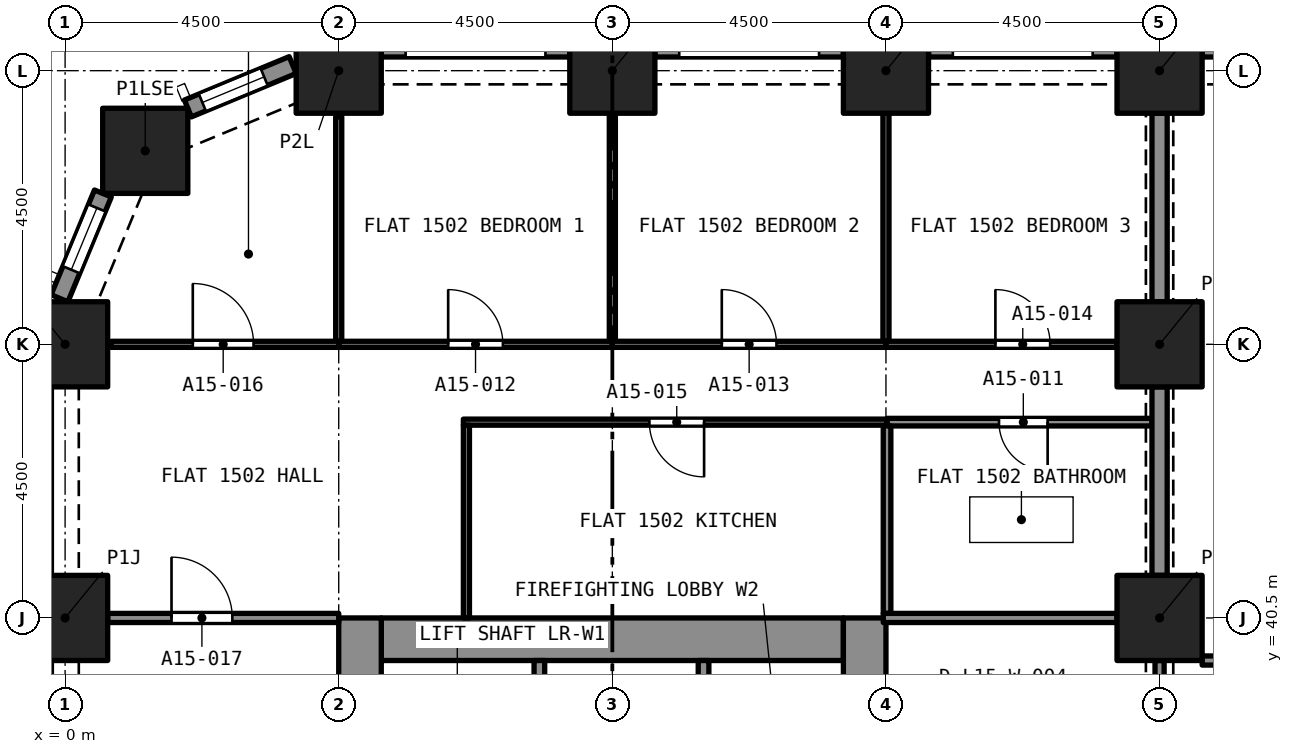
"""IFC4 building model, lengths in metres.
Left out: names, types, materials, properties, quantities, classifications, styles, units other than length and angle.
Written with IfcOpenShell. Run it as: python <this file> out.ifc"""

import sys

from ifc_helpers import new_model, si_unit, direction, frame, frame_2d, origin, origin_2d, place, context, subcontext, project, spatial, rectangle, extrude, element, fill, save


model = new_model("IFC4")
c1 = context("Model", 3, precision=1e-05, world=origin(), true_north=direction((0.0, 1.0)))
c2 = subcontext(c1, "Body", "Model", "MODEL_VIEW")
j1 = project(units=[si_unit("LENGTHUNIT", "METRE"), si_unit("PLANEANGLEUNIT", "RADIAN")], contexts=[c1])
p1 = place(None, origin())
s1 = spatial("IfcSite", under=j1, at=p1, CompositionType="ELEMENT")
p2 = place(p1, origin())
s2 = spatial("IfcBuilding", under=s1, at=p2, CompositionType="ELEMENT")
p3 = place(p2, frame((0.0, 0.0, 59.2)))
s3 = spatial("IfcBuildingStorey", under=s2, at=p3, CompositionType="ELEMENT", Elevation=59.2)
for number, where, z_axis, x_axis in (
    (1, (0.0, 40.5, 0.0), (0.0, 0.0, 1.0), (1.0, 0.0, 0.0)),
    (2, (18.0, 40.5, 0.0), (0.0, 0.0, 1.0), (1.0, 0.0, 0.0)),
    (3, (0.0, 45.0, 0.0), (0.0, 0.0, 1.0), (1.0, 0.0, 0.0)),
    (4, (18.0, 45.0, 0.0), (0.0, 0.0, 1.0), (1.0, 0.0, 0.0)),
    (5, (1.318, 48.182, 0.0), (0.0, 0.0, 1.0), (1.0, 0.0, 0.0)),
    (6, (4.5, 49.5, 0.0), (0.0, 0.0, 1.0), (1.0, 0.0, 0.0)),
    (7, (9.0, 49.5, 0.0), (0.0, 0.0, 1.0), (1.0, 0.0, 0.0)),
    (8, (13.5, 49.5, 0.0), (0.0, 0.0, 1.0), (1.0, 0.0, 0.0)),
    (9, (18.0, 49.5, 0.0), (0.0, 0.0, 1.0), (1.0, 0.0, 0.0)),
):
    element("IfcColumn", number, at=place(p3, frame(where, z_axis=z_axis, x_axis=x_axis)), inside=s3, PredefinedType="COLUMN", context=c2, shape_type="SweptSolid", body=[
        extrude(rectangle(XDim=1.4, YDim=1.4, at=origin_2d()), origin(), (0.0, 0.0, 1.0), 3.2),
    ])
p4 = place(p3, frame((5.2, 40.15, 0.0), z_axis=(0.0, 0.0, 1.0), x_axis=(1.0, 0.0, 0.0)))
e10 = element("IfcWall", 10, at=p4, inside=s3, PredefinedType="SOLIDWALL", context=c2, shape_type="SweptSolid", body=[
    extrude(rectangle(XDim=7.6, YDim=0.7, at=frame_2d((3.8, 0.0))), origin(), (0.0, 0.0, 1.0), 3.2),
])
p5 = place(p3, frame((4.85, 27.0, 0.0), z_axis=(0.0, 0.0, 1.0), x_axis=(0.0, 1.0, 0.0)))
e11 = element("IfcWall", 11, at=p5, inside=s3, PredefinedType="SOLIDWALL", context=c2, shape_type="SweptSolid", body=[
    extrude(rectangle(XDim=13.5, YDim=0.7, at=frame_2d((6.75, 0.0))), origin(), (0.0, 0.0, 1.0), 3.2),
])
p6 = place(p5, frame((8.95, 0.0, 0.0)))
e12 = element("IfcOpeningElement", 12, at=p6, cuts=e11, PredefinedType="OPENING", context=c2, shape_type="SweptSolid", body=[
    extrude(rectangle(XDim=1.2, YDim=2.1, at=frame_2d((0.6, 1.05))), frame((0.0, 0.36, 0.0), z_axis=(0.0, -1.0, 0.0), x_axis=(1.0, 0.0, 0.0)), (0.0, 0.0, 1.0), 0.72),
])
p7 = place(p3, frame((13.15, 27.0, 0.0), z_axis=(0.0, 0.0, 1.0), x_axis=(0.0, 1.0, 0.0)))
e13 = element("IfcWall", 13, at=p7, inside=s3, PredefinedType="SOLIDWALL", context=c2, shape_type="SweptSolid", body=[
    extrude(rectangle(XDim=13.5, YDim=0.7, at=frame_2d((6.75, 0.0))), origin(), (0.0, 0.0, 1.0), 3.2),
])
p8 = place(p7, frame((11.1, 0.0, 0.0)))
e14 = element("IfcOpeningElement", 14, at=p8, cuts=e13, PredefinedType="OPENING", context=c2, shape_type="SweptSolid", body=[
    extrude(rectangle(XDim=1.1, YDim=2.1, at=frame_2d((0.55, 1.05))), frame((0.0, 0.36, 0.0), z_axis=(0.0, -1.0, 0.0), x_axis=(1.0, 0.0, 0.0)), (0.0, 0.0, 1.0), 0.72),
])
p9 = place(p7, frame((8.95, 0.0, 0.0)))
e15 = element("IfcOpeningElement", 15, at=p9, cuts=e13, PredefinedType="OPENING", context=c2, shape_type="SweptSolid", body=[
    extrude(rectangle(XDim=1.2, YDim=2.1, at=frame_2d((0.6, 1.05))), frame((0.0, 0.36, 0.0), z_axis=(0.0, -1.0, 0.0), x_axis=(1.0, 0.0, 0.0)), (0.0, 0.0, 1.0), 0.72),
])
p10 = place(p3, frame((18.7, 49.875, 0.0), z_axis=(0.0, 0.0, 1.0), x_axis=(1.0, 0.0, 0.0)))
e16 = element("IfcWall", 16, at=p10, inside=s3, PredefinedType="SOLIDWALL", context=c2, shape_type="SweptSolid", body=[
    extrude(rectangle(XDim=3.1, YDim=0.3, at=frame_2d((1.55, 0.0))), origin(), (0.0, 0.0, 1.0), 3.2),
])
p11 = place(p10, frame((0.4, 0.0, 0.45)))
e17 = element("IfcOpeningElement", 17, at=p11, cuts=e16, PredefinedType="OPENING", context=c2, shape_type="SweptSolid", body=[
    extrude(rectangle(XDim=2.3, YDim=1.95, at=frame_2d((1.15, 0.975))), frame((0.0, 0.16, 0.0), z_axis=(0.0, -1.0, 0.0), x_axis=(1.0, 0.0, 0.0)), (0.0, 0.0, 1.0), 0.32),
])
p12 = place(p3, frame((14.2, 49.875, 0.0), z_axis=(0.0, 0.0, 1.0), x_axis=(1.0, 0.0, 0.0)))
e18 = element("IfcWall", 18, at=p12, inside=s3, PredefinedType="SOLIDWALL", context=c2, shape_type="SweptSolid", body=[
    extrude(rectangle(XDim=3.1, YDim=0.3, at=frame_2d((1.55, 0.0))), origin(), (0.0, 0.0, 1.0), 3.2),
])
p13 = place(p12, frame((0.4, 0.0, 0.45)))
e19 = element("IfcOpeningElement", 19, at=p13, cuts=e18, PredefinedType="OPENING", context=c2, shape_type="SweptSolid", body=[
    extrude(rectangle(XDim=2.3, YDim=1.95, at=frame_2d((1.15, 0.975))), frame((0.0, 0.16, 0.0), z_axis=(0.0, -1.0, 0.0), x_axis=(1.0, 0.0, 0.0)), (0.0, 0.0, 1.0), 0.32),
])
p14 = place(p3, frame((9.7, 49.875, 0.0), z_axis=(0.0, 0.0, 1.0), x_axis=(1.0, 0.0, 0.0)))
e20 = element("IfcWall", 20, at=p14, inside=s3, PredefinedType="SOLIDWALL", context=c2, shape_type="SweptSolid", body=[
    extrude(rectangle(XDim=3.1, YDim=0.3, at=frame_2d((1.55, 0.0))), origin(), (0.0, 0.0, 1.0), 3.2),
])
p15 = place(p14, frame((0.4, 0.0, 0.45)))
e21 = element("IfcOpeningElement", 21, at=p15, cuts=e20, PredefinedType="OPENING", context=c2, shape_type="SweptSolid", body=[
    extrude(rectangle(XDim=2.3, YDim=1.95, at=frame_2d((1.15, 0.975))), frame((0.0, 0.16, 0.0), z_axis=(0.0, -1.0, 0.0), x_axis=(1.0, 0.0, 0.0)), (0.0, 0.0, 1.0), 0.32),
])
p16 = place(p3, frame((5.2, 49.875, 0.0), z_axis=(0.0, 0.0, 1.0), x_axis=(1.0, 0.0, 0.0)))
e22 = element("IfcWall", 22, at=p16, inside=s3, PredefinedType="SOLIDWALL", context=c2, shape_type="SweptSolid", body=[
    extrude(rectangle(XDim=3.1, YDim=0.3, at=frame_2d((1.55, 0.0))), origin(), (0.0, 0.0, 1.0), 3.2),
])
p17 = place(p16, frame((0.4, 0.0, 0.45)))
e23 = element("IfcOpeningElement", 23, at=p17, cuts=e22, PredefinedType="OPENING", context=c2, shape_type="SweptSolid", body=[
    extrude(rectangle(XDim=2.3, YDim=1.95, at=frame_2d((1.15, 0.975))), frame((0.0, 0.16, 0.0), z_axis=(0.0, -1.0, 0.0), x_axis=(1.0, 0.0, 0.0)), (0.0, 0.0, 1.0), 0.32),
])
p18 = place(p3, frame((2.02, 48.878, 0.0), z_axis=(0.0, 0.0, 1.0), x_axis=(0.923903565336, 0.38262540684, 0.0)))
e24 = element("IfcWall", 24, at=p18, inside=s3, PredefinedType="SOLIDWALL", context=c2, shape_type="SweptSolid", body=[
    extrude(rectangle(XDim=1.865, YDim=0.3, at=frame_2d((0.933, 0.0))), origin(), (0.0, 0.0, 1.0), 3.2),
])
p19 = place(p18, frame((0.258, 0.0, 0.45)))
e25 = element("IfcOpeningElement", 25, at=p19, cuts=e24, PredefinedType="OPENING", context=c2, shape_type="SweptSolid", body=[
    extrude(rectangle(XDim=1.1, YDim=1.95, at=frame_2d((0.55, 0.975))), frame((0.0, 0.16, 0.0), z_axis=(0.0, -1.0, 0.0), x_axis=(1.0, 0.0, 0.0)), (0.0, 0.0, 1.0), 0.32),
])
p20 = place(p3, frame((-0.092, 45.757, 0.0), z_axis=(0.0, 0.0, 1.0), x_axis=(0.382737135771, 0.923857286003, 0.0)))
e26 = element("IfcWall", 26, at=p20, inside=s3, PredefinedType="SOLIDWALL", context=c2, shape_type="SweptSolid", body=[
    extrude(rectangle(XDim=1.865, YDim=0.3, at=frame_2d((0.933, 0.0))), origin(), (0.0, 0.0, 1.0), 3.2),
])
p21 = place(p20, frame((0.508, 0.0, 0.45)))
e27 = element("IfcOpeningElement", 27, at=p21, cuts=e26, PredefinedType="OPENING", context=c2, shape_type="SweptSolid", body=[
    extrude(rectangle(XDim=1.1, YDim=1.95, at=frame_2d((0.55, 0.975))), frame((0.0, 0.16, 0.0), z_axis=(0.0, -1.0, 0.0), x_axis=(1.0, 0.0, 0.0)), (0.0, 0.0, 1.0), 0.32),
])
p22 = place(p3, frame((17.875, 43.72, 0.0), z_axis=(0.0, 0.0, 1.0), x_axis=(-1.0, 0.0, 0.0)))
e28 = element("IfcWall", 28, at=p22, inside=s3, PredefinedType="PARTITIONING", context=c2, shape_type="SweptSolid", body=[
    extrude(rectangle(XDim=4.357, YDim=0.125, at=frame_2d((2.178, 0.0))), origin(), (0.0, 0.0, 1.0), 2.9),
])
p23 = place(p22, frame((1.716, 0.0, 0.0)))
e29 = element("IfcOpeningElement", 29, at=p23, cuts=e28, PredefinedType="OPENING", context=c2, shape_type="SweptSolid", body=[
    extrude(rectangle(XDim=0.8, YDim=2.1, at=frame_2d((0.4, 1.05))), frame((0.0, 0.073, 0.0), z_axis=(0.0, -1.0, 0.0), x_axis=(1.0, 0.0, 0.0)), (0.0, 0.0, 1.0), 0.145),
])
p24 = place(p3, frame((13.518, 40.575, 0.0), z_axis=(0.0, 0.0, 1.0), x_axis=(0.0, 1.0, 0.0)))
e30 = element("IfcWall", 30, at=p24, inside=s3, PredefinedType="PARTITIONING", context=c2, shape_type="SweptSolid", body=[
    extrude(rectangle(XDim=3.083, YDim=0.125, at=frame_2d((1.541, 0.0))), origin(), (0.0, 0.0, 1.0), 2.9),
])
p25 = place(p3, frame((18.0, 41.2, 0.0), z_axis=(0.0, 0.0, 1.0), x_axis=(0.0, 1.0, 0.0)))
e31 = element("IfcWall", 31, at=p25, inside=s3, PredefinedType="PARTITIONING", context=c2, shape_type="SweptSolid", body=[
    extrude(rectangle(XDim=3.1, YDim=0.25, at=frame_2d((1.55, 0.0))), origin(), (0.0, 0.0, 1.0), 2.38),
])
p26 = place(p3, frame((13.456, 40.5, 0.0), z_axis=(0.0, 0.0, 1.0), x_axis=(1.0, 0.0, 0.0)))
e32 = element("IfcWall", 32, at=p26, inside=s3, PredefinedType="PARTITIONING", context=c2, shape_type="SweptSolid", body=[
    extrude(rectangle(XDim=3.844, YDim=0.15, at=frame_2d((1.922, 0.0))), origin(), (0.0, 0.0, 1.0), 2.9),
])
p27 = place(p3, frame((9.0, 45.05, 0.0), z_axis=(0.0, 0.0, 1.0), x_axis=(0.0, 1.0, 0.0)))
e33 = element("IfcWall", 33, at=p27, inside=s3, PredefinedType="PARTITIONING", context=c2, shape_type="SweptSolid", body=[
    extrude(rectangle(XDim=3.75, YDim=0.1, at=frame_2d((1.875, 0.0))), origin(), (0.0, 0.0, 1.0), 2.9),
])
p28 = place(p3, frame((4.5, 45.0, 0.0), z_axis=(0.0, 0.0, 1.0), x_axis=(1.0, 0.0, 0.0)))
e34 = element("IfcWall", 34, at=p28, inside=s3, PredefinedType="PARTITIONING", context=c2, shape_type="SweptSolid", body=[
    extrude(rectangle(XDim=4.5, YDim=0.1, at=frame_2d((2.25, 0.0))), origin(), (0.0, 0.0, 1.0), 2.9),
])
p29 = place(p28, frame((1.8, 0.0, 0.0)))
e35 = element("IfcOpeningElement", 35, at=p29, cuts=e34, PredefinedType="OPENING", context=c2, shape_type="SweptSolid", body=[
    extrude(rectangle(XDim=0.9, YDim=2.1, at=frame_2d((0.45, 1.05))), frame((0.0, 0.06, 0.0), z_axis=(0.0, -1.0, 0.0), x_axis=(1.0, 0.0, 0.0)), (0.0, 0.0, 1.0), 0.12),
])
p30 = place(p3, frame((4.5, 45.05, 0.0), z_axis=(0.0, 0.0, 1.0), x_axis=(0.0, 1.0, 0.0)))
e36 = element("IfcWall", 36, at=p30, inside=s3, PredefinedType="PARTITIONING", context=c2, shape_type="SweptSolid", body=[
    extrude(rectangle(XDim=3.692, YDim=0.1, at=frame_2d((1.846, 0.0))), origin(), (0.0, 0.0, 1.0), 2.9),
])
p31 = place(p3, frame((13.5, 45.05, 0.0), z_axis=(0.0, 0.0, 1.0), x_axis=(0.0, 1.0, 0.0)))
e37 = element("IfcWall", 37, at=p31, inside=s3, PredefinedType="PARTITIONING", context=c2, shape_type="SweptSolid", body=[
    extrude(rectangle(XDim=3.75, YDim=0.1, at=frame_2d((1.875, 0.0))), origin(), (0.0, 0.0, 1.0), 2.9),
])
p32 = place(p3, frame((9.0, 45.0, 0.0), z_axis=(0.0, 0.0, 1.0), x_axis=(1.0, 0.0, 0.0)))
e38 = element("IfcWall", 38, at=p32, inside=s3, PredefinedType="PARTITIONING", context=c2, shape_type="SweptSolid", body=[
    extrude(rectangle(XDim=4.5, YDim=0.1, at=frame_2d((2.25, 0.0))), origin(), (0.0, 0.0, 1.0), 2.9),
])
p33 = place(p32, frame((1.8, 0.0, 0.0)))
e39 = element("IfcOpeningElement", 39, at=p33, cuts=e38, PredefinedType="OPENING", context=c2, shape_type="SweptSolid", body=[
    extrude(rectangle(XDim=0.9, YDim=2.1, at=frame_2d((0.45, 1.05))), frame((0.0, 0.06, 0.0), z_axis=(0.0, -1.0, 0.0), x_axis=(1.0, 0.0, 0.0)), (0.0, 0.0, 1.0), 0.12),
])
p34 = place(p3, frame((13.5, 45.0, 0.0), z_axis=(0.0, 0.0, 1.0), x_axis=(1.0, 0.0, 0.0)))
e40 = element("IfcWall", 40, at=p34, inside=s3, PredefinedType="PARTITIONING", context=c2, shape_type="SweptSolid", body=[
    extrude(rectangle(XDim=3.8, YDim=0.1, at=frame_2d((1.9, 0.0))), origin(), (0.0, 0.0, 1.0), 2.9),
])
p35 = place(p34, frame((1.8, 0.0, 0.0)))
e41 = element("IfcOpeningElement", 41, at=p35, cuts=e40, PredefinedType="OPENING", context=c2, shape_type="SweptSolid", body=[
    extrude(rectangle(XDim=0.9, YDim=2.1, at=frame_2d((0.45, 1.05))), frame((0.0, 0.06, 0.0), z_axis=(0.0, -1.0, 0.0), x_axis=(1.0, 0.0, 0.0)), (0.0, 0.0, 1.0), 0.12),
])
p36 = place(p3, frame((18.0, 45.7, 0.0), z_axis=(0.0, 0.0, 1.0), x_axis=(0.0, 1.0, 0.0)))
e42 = element("IfcWall", 42, at=p36, inside=s3, PredefinedType="PARTITIONING", context=c2, shape_type="SweptSolid", body=[
    extrude(rectangle(XDim=3.1, YDim=0.25, at=frame_2d((1.55, 0.0))), origin(), (0.0, 0.0, 1.0), 2.38),
])
p37 = place(p3, frame((13.518, 43.72, 0.0), z_axis=(0.0, 0.0, 1.0), x_axis=(-1.0, 0.0, 0.0)))
e43 = element("IfcWall", 43, at=p37, inside=s3, PredefinedType="PARTITIONING", context=c2, shape_type="SweptSolid", body=[
    extrude(rectangle(XDim=6.968, YDim=0.1, at=frame_2d((3.484, 0.0))), origin(), (0.0, 0.0, 1.0), 2.9),
])
p38 = place(p37, frame((3.009, 0.0, 0.0)))
e44 = element("IfcOpeningElement", 44, at=p38, cuts=e43, PredefinedType="OPENING", context=c2, shape_type="SweptSolid", body=[
    extrude(rectangle(XDim=0.9, YDim=2.1, at=frame_2d((0.45, 1.05))), frame((0.0, 0.06, 0.0), z_axis=(0.0, -1.0, 0.0), x_axis=(1.0, 0.0, 0.0)), (0.0, 0.0, 1.0), 0.12),
])
p39 = place(p3, frame((6.6, 40.5, 0.0), z_axis=(0.0, 0.0, 1.0), x_axis=(0.0, 1.0, 0.0)))
e45 = element("IfcWall", 45, at=p39, inside=s3, PredefinedType="PARTITIONING", context=c2, shape_type="SweptSolid", body=[
    extrude(rectangle(XDim=3.17, YDim=0.1, at=frame_2d((1.585, 0.0))), origin(), (0.0, 0.0, 1.0), 2.9),
])
p40 = place(p3, frame((0.758, 45.0, 0.0), z_axis=(0.0, 0.0, 1.0), x_axis=(1.0, 0.0, 0.0)))
e46 = element("IfcWall", 46, at=p40, inside=s3, PredefinedType="PARTITIONING", context=c2, shape_type="SweptSolid", body=[
    extrude(rectangle(XDim=3.742, YDim=0.1, at=frame_2d((1.871, 0.0))), origin(), (0.0, 0.0, 1.0), 2.9),
])
p41 = place(p40, frame((1.342, 0.0, 0.0)))
e47 = element("IfcOpeningElement", 47, at=p41, cuts=e46, PredefinedType="OPENING", context=c2, shape_type="SweptSolid", body=[
    extrude(rectangle(XDim=1.0, YDim=2.1, at=frame_2d((0.5, 1.05))), frame((0.0, 0.06, 0.0), z_axis=(0.0, -1.0, 0.0), x_axis=(1.0, 0.0, 0.0)), (0.0, 0.0, 1.0), 0.12),
])
p42 = place(p3, frame((0.7, 40.5, 0.0), z_axis=(0.0, 0.0, 1.0), x_axis=(1.0, 0.0, 0.0)))
e48 = element("IfcWall", 48, at=p42, inside=s3, PredefinedType="PARTITIONING", context=c2, shape_type="SweptSolid", body=[
    extrude(rectangle(XDim=3.8, YDim=0.15, at=frame_2d((1.9, 0.0))), origin(), (0.0, 0.0, 1.0), 2.9),
])
p43 = place(p42, frame((1.05, 0.0, 0.0)))
e49 = element("IfcOpeningElement", 49, at=p43, cuts=e48, PredefinedType="OPENING", context=c2, shape_type="SweptSolid", body=[
    extrude(rectangle(XDim=1.0, YDim=2.1, at=frame_2d((0.5, 1.05))), frame((0.0, 0.085, 0.0), z_axis=(0.0, -1.0, 0.0), x_axis=(1.0, 0.0, 0.0)), (0.0, 0.0, 1.0), 0.17),
])
p44 = place(p3, frame((18.7, 39.8, 0.0), z_axis=(0.0, 0.0, 1.0), x_axis=(1.0, 0.0, 0.0)))
e50 = element("IfcWall", 50, at=p44, inside=s3, PredefinedType="PARTITIONING", context=c2, shape_type="SweptSolid", body=[
    extrude(rectangle(XDim=8.3, YDim=0.15, at=frame_2d((4.15, 0.0))), origin(), (0.0, 0.0, 1.0), 2.75),
])
p45 = place(p44, frame((3.3, 0.0, 0.0)))
e51 = element("IfcOpeningElement", 51, at=p45, cuts=e50, PredefinedType="OPENING", context=c2, shape_type="SweptSolid", body=[
    extrude(rectangle(XDim=1.0, YDim=2.1, at=frame_2d((0.5, 1.05))), frame((0.0, 0.085, 0.0), z_axis=(0.0, -1.0, 0.0), x_axis=(1.0, 0.0, 0.0)), (0.0, 0.0, 1.0), 0.17),
])
p46 = place(p3, frame((18.0, 39.8, 0.0), z_axis=(0.0, 0.0, 1.0), x_axis=(0.0, -1.0, 0.0)))
e52 = element("IfcWall", 52, at=p46, inside=s3, PredefinedType="PARTITIONING", context=c2, shape_type="SweptSolid", body=[
    extrude(rectangle(XDim=3.1, YDim=0.15, at=frame_2d((1.55, 0.0))), origin(), (0.0, 0.0, 1.0), 2.38),
])
p47 = place(p46, frame((0.95, 0.0, 0.0)))
e53 = element("IfcOpeningElement", 53, at=p47, cuts=e52, PredefinedType="OPENING", context=c2, shape_type="SweptSolid", body=[
    extrude(rectangle(XDim=1.2, YDim=2.1, at=frame_2d((0.6, 1.05))), frame((0.0, 0.085, 0.0), z_axis=(0.0, -1.0, 0.0), x_axis=(1.0, 0.0, 0.0)), (0.0, 0.0, 1.0), 0.17),
])
p48 = place(p3, frame((7.8, 37.5, 0.0), z_axis=(0.0, 0.0, 1.0), x_axis=(0.0, 1.0, 0.0)))
e54 = element("IfcWall", 54, at=p48, inside=s3, PredefinedType="SOLIDWALL", context=c2, shape_type="SweptSolid", body=[
    extrude(rectangle(XDim=2.3, YDim=0.175, at=frame_2d((1.15, 0.0))), origin(), (0.0, 0.0, 1.0), 2.9),
])
p49 = place(p3, frame((10.5, 37.5, 0.0), z_axis=(0.0, 0.0, 1.0), x_axis=(0.0, 1.0, 0.0)))
e55 = element("IfcWall", 55, at=p49, inside=s3, PredefinedType="SOLIDWALL", context=c2, shape_type="SweptSolid", body=[
    extrude(rectangle(XDim=2.3, YDim=0.175, at=frame_2d((1.15, 0.0))), origin(), (0.0, 0.0, 1.0), 2.9),
])
p50 = place(p49, frame((0.65, 0.0, 0.0)))
e56 = element("IfcOpeningElement", 56, at=p50, cuts=e55, PredefinedType="OPENING", context=c2, shape_type="SweptSolid", body=[
    extrude(rectangle(XDim=1.0, YDim=2.1, at=frame_2d((0.5, 1.05))), frame((0.0, 0.097, 0.0), z_axis=(0.0, -1.0, 0.0), x_axis=(1.0, 0.0, 0.0)), (0.0, 0.0, 1.0), 0.195),
])
p51 = place(p19, origin())
e57 = element("IfcWindow", 57, at=p51, inside=s3, PartitioningType="SINGLE_PANEL", PredefinedType="WINDOW", context=c2, shape_type="SweptSolid", body=[
    extrude(rectangle(XDim=1.1, YDim=1.95, at=frame_2d((0.55, 0.975))), frame((0.0, 0.03, 0.0), z_axis=(0.0, -1.0, 0.0), x_axis=(1.0, 0.0, 0.0)), (0.0, 0.0, 1.0), 0.06),
])
fill(e25, e57)
p52 = place(p21, origin())
e58 = element("IfcWindow", 58, at=p52, inside=s3, PartitioningType="SINGLE_PANEL", PredefinedType="WINDOW", context=c2, shape_type="SweptSolid", body=[
    extrude(rectangle(XDim=1.1, YDim=1.95, at=frame_2d((0.55, 0.975))), frame((0.0, 0.03, 0.0), z_axis=(0.0, -1.0, 0.0), x_axis=(1.0, 0.0, 0.0)), (0.0, 0.0, 1.0), 0.06),
])
fill(e27, e58)
p53 = place(p23, origin())
e59 = element("IfcDoor", 59, at=p53, inside=s3, OperationType="SINGLE_SWING_LEFT", PredefinedType="DOOR", context=c2, shape_type="SweptSolid", body=[
    extrude(rectangle(XDim=0.8, YDim=2.1, at=frame_2d((0.4, 1.05))), frame((0.0, 0.025, 0.0), z_axis=(0.0, -1.0, 0.0), x_axis=(1.0, 0.0, 0.0)), (0.0, 0.0, 1.0), 0.05),
])
fill(e29, e59)
p54 = place(p29, origin())
e60 = element("IfcDoor", 60, at=p54, inside=s3, OperationType="SINGLE_SWING_RIGHT", PredefinedType="DOOR", context=c2, shape_type="SweptSolid", body=[
    extrude(rectangle(XDim=0.9, YDim=2.1, at=frame_2d((0.45, 1.05))), frame((0.0, 0.025, 0.0), z_axis=(0.0, -1.0, 0.0), x_axis=(1.0, 0.0, 0.0)), (0.0, 0.0, 1.0), 0.05),
])
fill(e35, e60)
p55 = place(p33, origin())
e61 = element("IfcDoor", 61, at=p55, inside=s3, OperationType="SINGLE_SWING_LEFT", PredefinedType="DOOR", context=c2, shape_type="SweptSolid", body=[
    extrude(rectangle(XDim=0.9, YDim=2.1, at=frame_2d((0.45, 1.05))), frame((0.0, 0.025, 0.0), z_axis=(0.0, -1.0, 0.0), x_axis=(1.0, 0.0, 0.0)), (0.0, 0.0, 1.0), 0.05),
])
fill(e39, e61)
p56 = place(p35, origin())
e62 = element("IfcDoor", 62, at=p56, inside=s3, OperationType="SINGLE_SWING_RIGHT", PredefinedType="DOOR", context=c2, shape_type="SweptSolid", body=[
    extrude(rectangle(XDim=0.9, YDim=2.1, at=frame_2d((0.45, 1.05))), frame((0.0, 0.025, 0.0), z_axis=(0.0, -1.0, 0.0), x_axis=(1.0, 0.0, 0.0)), (0.0, 0.0, 1.0), 0.05),
])
fill(e41, e62)
p57 = place(p38, origin())
e63 = element("IfcDoor", 63, at=p57, inside=s3, OperationType="SINGLE_SWING_LEFT", PredefinedType="DOOR", context=c2, shape_type="SweptSolid", body=[
    extrude(rectangle(XDim=0.9, YDim=2.1, at=frame_2d((0.45, 1.05))), frame((0.0, 0.025, 0.0), z_axis=(0.0, -1.0, 0.0), x_axis=(1.0, 0.0, 0.0)), (0.0, 0.0, 1.0), 0.05),
])
fill(e44, e63)
p58 = place(p41, origin())
e64 = element("IfcDoor", 64, at=p58, inside=s3, OperationType="SINGLE_SWING_LEFT", PredefinedType="DOOR", context=c2, shape_type="SweptSolid", body=[
    extrude(rectangle(XDim=1.0, YDim=2.1, at=frame_2d((0.5, 1.05))), frame((0.0, 0.025, 0.0), z_axis=(0.0, -1.0, 0.0), x_axis=(1.0, 0.0, 0.0)), (0.0, 0.0, 1.0), 0.05),
])
fill(e47, e64)
p59 = place(p43, origin())
e65 = element("IfcDoor", 65, at=p59, inside=s3, OperationType="SINGLE_SWING_LEFT", PredefinedType="DOOR", context=c2, shape_type="SweptSolid", body=[
    extrude(rectangle(XDim=1.0, YDim=2.1, at=frame_2d((0.5, 1.05))), frame((0.0, 0.025, 0.0), z_axis=(0.0, -1.0, 0.0), x_axis=(1.0, 0.0, 0.0)), (0.0, 0.0, 1.0), 0.05),
])
fill(e49, e65)
save(model, sys.argv[1])
